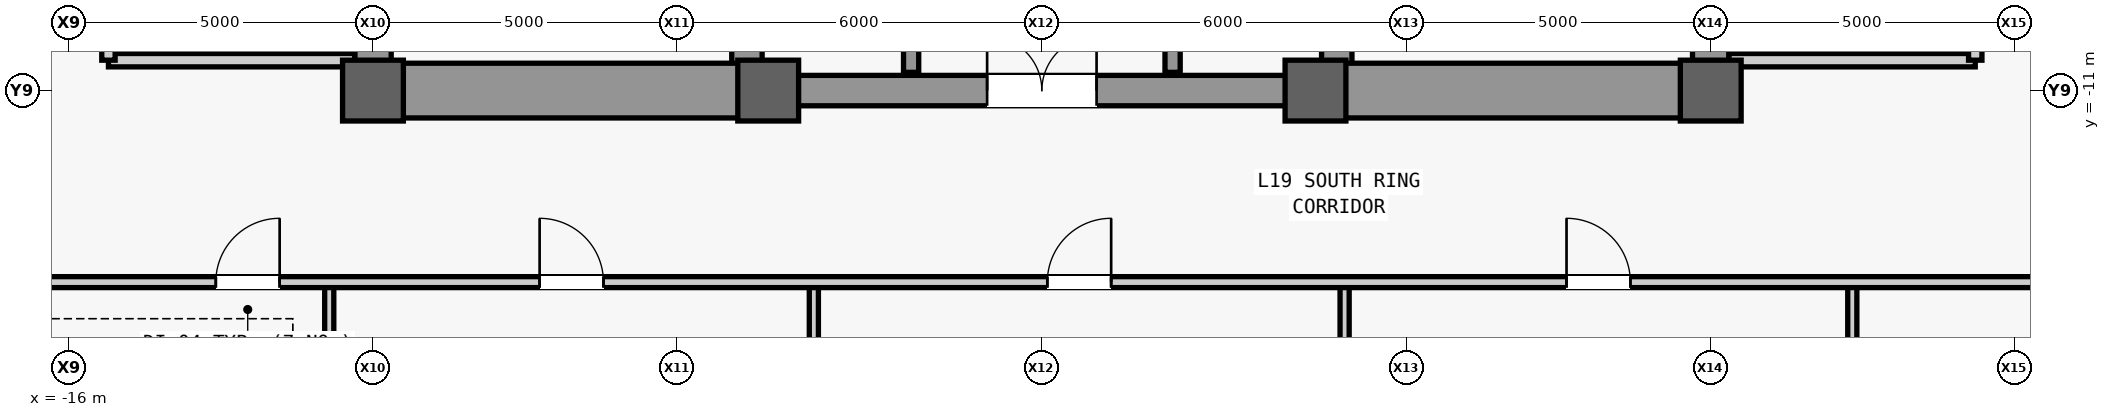
"""IFC4 building model, lengths in metres.
Left out: names, types, materials, properties, quantities, classifications, styles, units other than length and angle.
Written with IfcOpenShell. Run it as: python <this file> out.ifc"""

import sys

from ifc_helpers import new_model, si_unit, direction, frame, frame_2d, origin, origin_2d, place, context, subcontext, project, spatial, rectangle, extrude, source, transform, mapped, element, fill, save


model = new_model("IFC4")
c1 = context("Model", 3, precision=1e-05, world=origin(), true_north=direction((0.0, 1.0)))
c2 = subcontext(c1, "Body", "Model", "MODEL_VIEW")
j1 = project(units=[si_unit("LENGTHUNIT", "METRE"), si_unit("PLANEANGLEUNIT", "RADIAN")], contexts=[c1])
p1 = place(None, origin())
s1 = spatial("IfcSite", under=j1, at=p1, CompositionType="ELEMENT")
p2 = place(p1, origin())
s2 = spatial("IfcBuilding", under=s1, at=p2, CompositionType="ELEMENT")
p3 = place(p2, frame((0.0, 0.0, 87.2)))
s3 = spatial("IfcBuildingStorey", under=s2, at=p3, CompositionType="ELEMENT", Elevation=87.2)
m1 = source(origin(), c2, "Body", "SweptSolid", [
    extrude(rectangle(XDim=22.0, YDim=0.6, at=frame_2d((11.0, 0.0))), origin(), (0.0, 0.0, 1.0), 3.94),
])
p4 = place(p3, frame((-11.0, -11.0, 0.0), z_axis=(0.0, 0.0, 1.0), x_axis=(0.0, 1.0, 0.0)))
e1 = element("IfcWall", 1, at=p4, inside=s3, PredefinedType="SHEAR", context=c2, shape_type="MappedRepresentation", body=[
    mapped(m1, transform((0.0, 0.0, 0.0), scale=1.0)),
])
m2 = source(origin(), c2, "Body", "SweptSolid", [
    extrude(rectangle(XDim=1.1, YDim=2.2, at=frame_2d((0.55, 1.1))), frame((0.0, 0.31, 0.0), z_axis=(0.0, -1.0, 0.0), x_axis=(1.0, 0.0, 0.0)), (0.0, 0.0, 1.0), 0.62),
])
p5 = place(p4, frame((0.8, 0.0, 0.0)))
e2 = element("IfcOpeningElement", 2, at=p5, cuts=e1, PredefinedType="OPENING", context=c2, shape_type="MappedRepresentation", body=[
    mapped(m2, transform((0.0, 0.0, 0.0), scale=1.0)),
])
p6 = place(p4, frame((12.5, 0.0, 0.0)))
e3 = element("IfcOpeningElement", 3, at=p6, cuts=e1, PredefinedType="OPENING", context=c2, shape_type="MappedRepresentation", body=[
    mapped(m2, transform((0.0, 0.0, 0.0), scale=1.0)),
])
m3 = source(origin(), c2, "Body", "SweptSolid", [
    extrude(rectangle(XDim=0.9, YDim=2.15, at=frame_2d((0.45, 1.075))), frame((0.0, 0.31, 0.0), z_axis=(0.0, -1.0, 0.0), x_axis=(1.0, 0.0, 0.0)), (0.0, 0.0, 1.0), 0.62),
])
p7 = place(p4, frame((6.85, 0.0, 0.0)))
e4 = element("IfcOpeningElement", 4, at=p7, cuts=e1, PredefinedType="OPENING", context=c2, shape_type="MappedRepresentation", body=[
    mapped(m3, transform((0.0, 0.0, 0.0), scale=1.0)),
])
m4 = source(origin(), c2, "Body", "SweptSolid", [
    extrude(rectangle(XDim=1.3, YDim=2.3, at=frame_2d((0.65, 1.15))), frame((0.0, 0.31, 0.0), z_axis=(0.0, -1.0, 0.0), x_axis=(1.0, 0.0, 0.0)), (0.0, 0.0, 1.0), 0.62),
])
p8 = place(p4, frame((2.7, 0.0, 0.0)))
e5 = element("IfcOpeningElement", 5, at=p8, cuts=e1, PredefinedType="OPENING", context=c2, shape_type="MappedRepresentation", body=[
    mapped(m4, transform((0.0, 0.0, 0.0), scale=1.0)),
])
p9 = place(p3, frame((11.0, -11.0, 0.0), z_axis=(0.0, 0.0, 1.0), x_axis=(0.0, 1.0, 0.0)))
e6 = element("IfcWall", 6, at=p9, inside=s3, PredefinedType="SHEAR", context=c2, shape_type="MappedRepresentation", body=[
    mapped(m1, transform((0.0, 0.0, 0.0), scale=1.0)),
])
p10 = place(p9, frame((0.8, 0.0, 0.0)))
e7 = element("IfcOpeningElement", 7, at=p10, cuts=e6, PredefinedType="OPENING", context=c2, shape_type="MappedRepresentation", body=[
    mapped(m2, transform((0.0, 0.0, 0.0), scale=1.0)),
])
p11 = place(p9, frame((6.2, 0.0, 0.0)))
e8 = element("IfcOpeningElement", 8, at=p11, cuts=e6, PredefinedType="OPENING", context=c2, shape_type="MappedRepresentation", body=[
    mapped(m3, transform((0.0, 0.0, 0.0), scale=1.0)),
])
p12 = place(p9, frame((8.05, 0.0, 0.0)))
e9 = element("IfcOpeningElement", 9, at=p12, cuts=e6, PredefinedType="OPENING", context=c2, shape_type="MappedRepresentation", body=[
    mapped(m3, transform((0.0, 0.0, 0.0), scale=1.0)),
])
p13 = place(p9, frame((2.7, 0.0, 0.0)))
e10 = element("IfcOpeningElement", 10, at=p13, cuts=e6, PredefinedType="OPENING", context=c2, shape_type="MappedRepresentation", body=[
    mapped(m4, transform((0.0, 0.0, 0.0), scale=1.0)),
])
p14 = place(p9, frame((13.35, 0.0, 0.0)))
e11 = element("IfcOpeningElement", 11, at=p14, cuts=e6, PredefinedType="OPENING", context=c2, shape_type="MappedRepresentation", body=[
    mapped(m4, transform((0.0, 0.0, 0.0), scale=1.0)),
])
m5 = source(origin(), c2, "Body", "SweptSolid", [
    extrude(rectangle(XDim=21.4, YDim=0.5, at=frame_2d((10.7, 0.0))), origin(), (0.0, 0.0, 1.0), 3.94),
])
for number, where, z_axis, x_axis in (
    (12, (-4.85, -10.7, 0.0), (0.0, 0.0, 1.0), (0.0, 1.0, 0.0)),
    (13, (4.85, -10.7, 0.0), (0.0, 0.0, 1.0), (0.0, 1.0, 0.0)),
):
    element("IfcWall", number, at=place(p3, frame(where, z_axis=z_axis, x_axis=x_axis)), inside=s3, PredefinedType="SHEAR", context=c2, shape_type="MappedRepresentation", body=[
        mapped(m5, transform((0.0, 0.0, 0.0), scale=1.0)),
    ])
m6 = source(origin(), c2, "Body", "SweptSolid", [
    extrude(rectangle(XDim=5.85, YDim=0.9, at=frame_2d((2.925, 0.0))), origin(), (0.0, 0.0, 1.0), 3.94),
])
for number, where, z_axis, x_axis in (
    (14, (-10.7, -11.0, 0.0), (0.0, 0.0, 1.0), (1.0, 0.0, 0.0)),
    (15, (4.85, -11.0, 0.0), (0.0, 0.0, 1.0), (1.0, 0.0, 0.0)),
):
    element("IfcWall", number, at=place(p3, frame(where, z_axis=z_axis, x_axis=x_axis)), inside=s3, PredefinedType="SHEAR", context=c2, shape_type="MappedRepresentation", body=[
        mapped(m6, transform((0.0, 0.0, 0.0), scale=1.0)),
    ])
m7 = source(origin(), c2, "Body", "SweptSolid", [
    extrude(rectangle(XDim=9.2, YDim=0.5, at=frame_2d((4.6, 0.0))), origin(), (0.0, 0.0, 1.0), 3.94),
])
p15 = place(p3, frame((-4.6, -11.0, 0.0), z_axis=(0.0, 0.0, 1.0), x_axis=(1.0, 0.0, 0.0)))
e16 = element("IfcWall", 16, at=p15, inside=s3, PredefinedType="SHEAR", context=c2, shape_type="MappedRepresentation", body=[
    mapped(m7, transform((0.0, 0.0, 0.0), scale=1.0)),
])
m8 = source(origin(), c2, "Body", "SweptSolid", [
    extrude(rectangle(XDim=1.8, YDim=2.25, at=frame_2d((0.9, 1.125))), frame((0.0, 0.26, 0.0), z_axis=(0.0, -1.0, 0.0), x_axis=(1.0, 0.0, 0.0)), (0.0, 0.0, 1.0), 0.52),
])
p16 = place(p15, frame((3.7, 0.0, 0.0)))
e17 = element("IfcOpeningElement", 17, at=p16, cuts=e16, PredefinedType="OPENING", context=c2, shape_type="MappedRepresentation", body=[
    mapped(m8, transform((0.0, 0.0, 0.0), scale=1.0)),
])
m9 = source(origin(), c2, "Body", "SweptSolid", [
    extrude(rectangle(XDim=1.0, YDim=1.0, at=origin_2d()), origin(), (0.0, 0.0, 1.0), 4.2),
])
for number, where, z_axis, x_axis in (
    (18, (-11.0, -11.0, 0.0), (0.0, 0.0, 1.0), (1.0, 0.0, 0.0)),
    (19, (-4.5, -11.0, 0.0), (0.0, 0.0, 1.0), (1.0, 0.0, 0.0)),
    (20, (4.5, -11.0, 0.0), (0.0, 0.0, 1.0), (1.0, 0.0, 0.0)),
    (21, (11.0, -11.0, 0.0), (0.0, 0.0, 1.0), (1.0, 0.0, 0.0)),
):
    element("IfcColumn", number, at=place(p3, frame(where, z_axis=z_axis, x_axis=x_axis)), inside=s3, PredefinedType="COLUMN", context=c2, shape_type="MappedRepresentation", body=[
        mapped(m9, transform((0.0, 0.0, 0.0), scale=1.0)),
    ])
m10 = source(origin(), c2, "Body", "SweptSolid", [
    extrude(rectangle(XDim=4.05, YDim=0.22, at=frame_2d((2.025, 0.0))), origin(), (0.0, 0.0, 1.0), 3.94),
])
p17 = place(p3, frame((-15.35, -10.5, 0.0), z_axis=(0.0, 0.0, 1.0), x_axis=(1.0, 0.0, 0.0)))
e22 = element("IfcWall", 22, at=p17, inside=s3, PredefinedType="PARTITIONING", context=c2, shape_type="MappedRepresentation", body=[
    mapped(m10, transform((0.0, 0.0, 0.0), scale=1.0)),
])
m11 = source(origin(), c2, "Body", "SweptSolid", [
    extrude(rectangle(XDim=4.4, YDim=0.22, at=frame_2d((2.2, 0.0))), origin(), (0.0, 0.0, 1.0), 3.94),
])
p18 = place(p3, frame((-15.35, -10.5, 0.0), z_axis=(0.0, 0.0, 1.0), x_axis=(0.0, 1.0, 0.0)))
e23 = element("IfcWall", 23, at=p18, inside=s3, PredefinedType="PARTITIONING", context=c2, shape_type="MappedRepresentation", body=[
    mapped(m11, transform((0.0, 0.0, 0.0), scale=1.0)),
])
m12 = source(origin(), c2, "Body", "SweptSolid", [
    extrude(rectangle(XDim=1.2, YDim=2.2, at=frame_2d((0.6, 1.1))), frame((0.0, 0.12, 0.0), z_axis=(0.0, -1.0, 0.0), x_axis=(1.0, 0.0, 0.0)), (0.0, 0.0, 1.0), 0.24),
])
p19 = place(p18, frame((1.6, 0.0, 0.0)))
e24 = element("IfcOpeningElement", 24, at=p19, cuts=e23, PredefinedType="OPENING", context=c2, shape_type="MappedRepresentation", body=[
    mapped(m12, transform((0.0, 0.0, 0.0), scale=1.0)),
])
p20 = place(p3, frame((11.3, -10.5, 0.0), z_axis=(0.0, 0.0, 1.0), x_axis=(1.0, 0.0, 0.0)))
e25 = element("IfcWall", 25, at=p20, inside=s3, PredefinedType="PARTITIONING", context=c2, shape_type="MappedRepresentation", body=[
    mapped(m10, transform((0.0, 0.0, 0.0), scale=1.0)),
])
p21 = place(p3, frame((15.35, -10.5, 0.0), z_axis=(0.0, 0.0, 1.0), x_axis=(0.0, 1.0, 0.0)))
e26 = element("IfcWall", 26, at=p21, inside=s3, PredefinedType="PARTITIONING", context=c2, shape_type="MappedRepresentation", body=[
    mapped(m11, transform((0.0, 0.0, 0.0), scale=1.0)),
])
p22 = place(p21, frame((1.6, 0.0, 0.0)))
e27 = element("IfcOpeningElement", 27, at=p22, cuts=e26, PredefinedType="OPENING", context=c2, shape_type="MappedRepresentation", body=[
    mapped(m12, transform((0.0, 0.0, 0.0), scale=1.0)),
])
m13 = source(origin(), c2, "Body", "SweptSolid", [
    extrude(rectangle(XDim=5.4, YDim=0.25, at=frame_2d((2.7, 0.0))), origin(), (0.0, 0.0, 1.0), 3.94),
])
p23 = place(p3, frame((-2.15, -10.7, 0.0), z_axis=(0.0, 0.0, 1.0), x_axis=(0.0, 1.0, 0.0)))
e28 = element("IfcWall", 28, at=p23, inside=s3, PredefinedType="SHEAR", context=c2, shape_type="MappedRepresentation", body=[
    mapped(m13, transform((0.0, 0.0, 0.0), scale=1.0)),
])
m14 = source(origin(), c2, "Body", "SweptSolid", [
    extrude(rectangle(XDim=1.2, YDim=2.3, at=frame_2d((0.6, 1.15))), frame((0.0, 0.135, 0.0), z_axis=(0.0, -1.0, 0.0), x_axis=(1.0, 0.0, 0.0)), (0.0, 0.0, 1.0), 0.27),
])
p24 = place(p23, frame((0.9, 0.0, 0.0)))
e29 = element("IfcOpeningElement", 29, at=p24, cuts=e28, PredefinedType="OPENING", context=c2, shape_type="MappedRepresentation", body=[
    mapped(m14, transform((0.0, 0.0, 0.0), scale=1.0)),
])
p25 = place(p23, frame((3.2, 0.0, 0.0)))
e30 = element("IfcOpeningElement", 30, at=p25, cuts=e28, PredefinedType="OPENING", context=c2, shape_type="MappedRepresentation", body=[
    mapped(m14, transform((0.0, 0.0, 0.0), scale=1.0)),
])
p26 = place(p3, frame((2.15, -10.7, 0.0), z_axis=(0.0, 0.0, 1.0), x_axis=(0.0, 1.0, 0.0)))
e31 = element("IfcWall", 31, at=p26, inside=s3, PredefinedType="SHEAR", context=c2, shape_type="MappedRepresentation", body=[
    mapped(m13, transform((0.0, 0.0, 0.0), scale=1.0)),
])
p27 = place(p26, frame((0.9, 0.0, 0.0)))
e32 = element("IfcOpeningElement", 32, at=p27, cuts=e31, PredefinedType="OPENING", context=c2, shape_type="MappedRepresentation", body=[
    mapped(m14, transform((0.0, 0.0, 0.0), scale=1.0)),
])
p28 = place(p26, frame((3.2, 0.0, 0.0)))
e33 = element("IfcOpeningElement", 33, at=p28, cuts=e31, PredefinedType="OPENING", context=c2, shape_type="MappedRepresentation", body=[
    mapped(m14, transform((0.0, 0.0, 0.0), scale=1.0)),
])
m15 = source(origin(), c2, "Body", "SweptSolid", [
    extrude(rectangle(XDim=17.85, YDim=0.15, at=frame_2d((8.925, 0.0))), origin(), (0.0, 0.0, 1.0), 3.94),
])
for number, where, z_axis, x_axis in (
    (34, (-11.719, -32.0, 0.0), (0.0, 0.0, 1.0), (0.0, 1.0, 0.0)),
    (35, (-3.75, -32.0, 0.0), (0.0, 0.0, 1.0), (0.0, 1.0, 0.0)),
    (36, (4.979, -32.0, 0.0), (0.0, 0.0, 1.0), (0.0, 1.0, 0.0)),
):
    element("IfcWall", number, at=place(p3, frame(where, z_axis=z_axis, x_axis=x_axis)), inside=s3, PredefinedType="PARTITIONING", context=c2, shape_type="MappedRepresentation", body=[
        mapped(m15, transform((0.0, 0.0, 0.0), scale=1.0)),
    ])
p29 = place(p3, frame((13.328, -32.0, 0.0), z_axis=(0.0, 0.0, 1.0), x_axis=(0.0, 1.0, 0.0)))
e37 = element("IfcWall", 37, at=p29, inside=s3, PredefinedType="PARTITIONING", context=c2, shape_type="MappedRepresentation", body=[
    mapped(m15, transform((0.0, 0.0, 0.0), scale=1.0)),
])
m16 = source(origin(), c2, "Body", "SweptSolid", [
    extrude(rectangle(XDim=0.95, YDim=2.15, at=frame_2d((0.475, 1.075))), frame((0.0, 0.085, 0.0), z_axis=(0.0, -1.0, 0.0), x_axis=(1.0, 0.0, 0.0)), (0.0, 0.0, 1.0), 0.17),
])
p30 = place(p29, frame((13.091, 0.0, 0.0)))
e38 = element("IfcOpeningElement", 38, at=p30, cuts=e37, PredefinedType="OPENING", context=c2, shape_type="MappedRepresentation", body=[
    mapped(m16, transform((0.0, 0.0, 0.0), scale=1.0)),
])
m17 = source(origin(), c2, "Body", "SweptSolid", [
    extrude(rectangle(XDim=37.95, YDim=0.18, at=frame_2d((18.975, 0.0))), origin(), (0.0, 0.0, 1.0), 3.94),
])
p31 = place(p3, frame((-18.55, -14.15, 0.0), z_axis=(0.0, 0.0, 1.0), x_axis=(1.0, 0.0, 0.0)))
e39 = element("IfcWall", 39, at=p31, inside=s3, PredefinedType="PARTITIONING", context=c2, shape_type="MappedRepresentation", body=[
    mapped(m17, transform((0.0, 0.0, 0.0), scale=1.0)),
])
m18 = source(origin(), c2, "Body", "SweptSolid", [
    extrude(rectangle(XDim=1.05, YDim=2.2, at=frame_2d((0.525, 1.1))), frame((0.0, 0.1, 0.0), z_axis=(0.0, -1.0, 0.0), x_axis=(1.0, 0.0, 0.0)), (0.0, 0.0, 1.0), 0.2),
])
p32 = place(p31, frame((4.966, 0.0, 0.0)))
e40 = element("IfcOpeningElement", 40, at=p32, cuts=e39, PredefinedType="OPENING", context=c2, shape_type="MappedRepresentation", body=[
    mapped(m18, transform((0.0, 0.0, 0.0), scale=1.0)),
])
p33 = place(p31, frame((10.291, 0.0, 0.0)))
e41 = element("IfcOpeningElement", 41, at=p33, cuts=e39, PredefinedType="OPENING", context=c2, shape_type="MappedRepresentation", body=[
    mapped(m18, transform((0.0, 0.0, 0.0), scale=1.0)),
])
p34 = place(p31, frame((18.64, 0.0, 0.0)))
e42 = element("IfcOpeningElement", 42, at=p34, cuts=e39, PredefinedType="OPENING", context=c2, shape_type="MappedRepresentation", body=[
    mapped(m18, transform((0.0, 0.0, 0.0), scale=1.0)),
])
p35 = place(p31, frame((27.178, 0.0, 0.0)))
e43 = element("IfcOpeningElement", 43, at=p35, cuts=e39, PredefinedType="OPENING", context=c2, shape_type="MappedRepresentation", body=[
    mapped(m18, transform((0.0, 0.0, 0.0), scale=1.0)),
])
m19 = source(origin(), c2, "Body", "SweptSolid", [
    extrude(rectangle(XDim=1.8, YDim=2.25, at=frame_2d((0.9, 1.125))), frame((0.0, 0.025, 0.0), z_axis=(0.0, -1.0, 0.0), x_axis=(1.0, 0.0, 0.0)), (0.0, 0.0, 1.0), 0.05),
])
p36 = place(p16, origin())
e44 = element("IfcDoor", 44, at=p36, inside=s3, OperationType="SINGLE_SWING_LEFT", PredefinedType="DOOR", context=c2, shape_type="MappedRepresentation", body=[
    mapped(m19, transform((0.0, 0.0, 0.0), scale=1.0)),
])
fill(e17, e44)
m20 = source(origin(), c2, "Body", "SweptSolid", [
    extrude(rectangle(XDim=1.05, YDim=2.2, at=frame_2d((0.525, 1.1))), frame((0.0, 0.025, 0.0), z_axis=(0.0, -1.0, 0.0), x_axis=(1.0, 0.0, 0.0)), (0.0, 0.0, 1.0), 0.05),
])
p37 = place(p32, origin())
e45 = element("IfcDoor", 45, at=p37, inside=s3, OperationType="SINGLE_SWING_RIGHT", PredefinedType="DOOR", context=c2, shape_type="MappedRepresentation", body=[
    mapped(m20, transform((0.0, 0.0, 0.0), scale=1.0)),
])
fill(e40, e45)
p38 = place(p33, origin())
e46 = element("IfcDoor", 46, at=p38, inside=s3, OperationType="SINGLE_SWING_LEFT", PredefinedType="DOOR", context=c2, shape_type="MappedRepresentation", body=[
    mapped(m20, transform((0.0, 0.0, 0.0), scale=1.0)),
])
fill(e41, e46)
p39 = place(p34, origin())
e47 = element("IfcDoor", 47, at=p39, inside=s3, OperationType="SINGLE_SWING_RIGHT", PredefinedType="DOOR", context=c2, shape_type="MappedRepresentation", body=[
    mapped(m20, transform((0.0, 0.0, 0.0), scale=1.0)),
])
fill(e42, e47)
p40 = place(p35, origin())
e48 = element("IfcDoor", 48, at=p40, inside=s3, OperationType="SINGLE_SWING_LEFT", PredefinedType="DOOR", context=c2, shape_type="MappedRepresentation", body=[
    mapped(m20, transform((0.0, 0.0, 0.0), scale=1.0)),
])
fill(e43, e48)
save(model, sys.argv[1])
